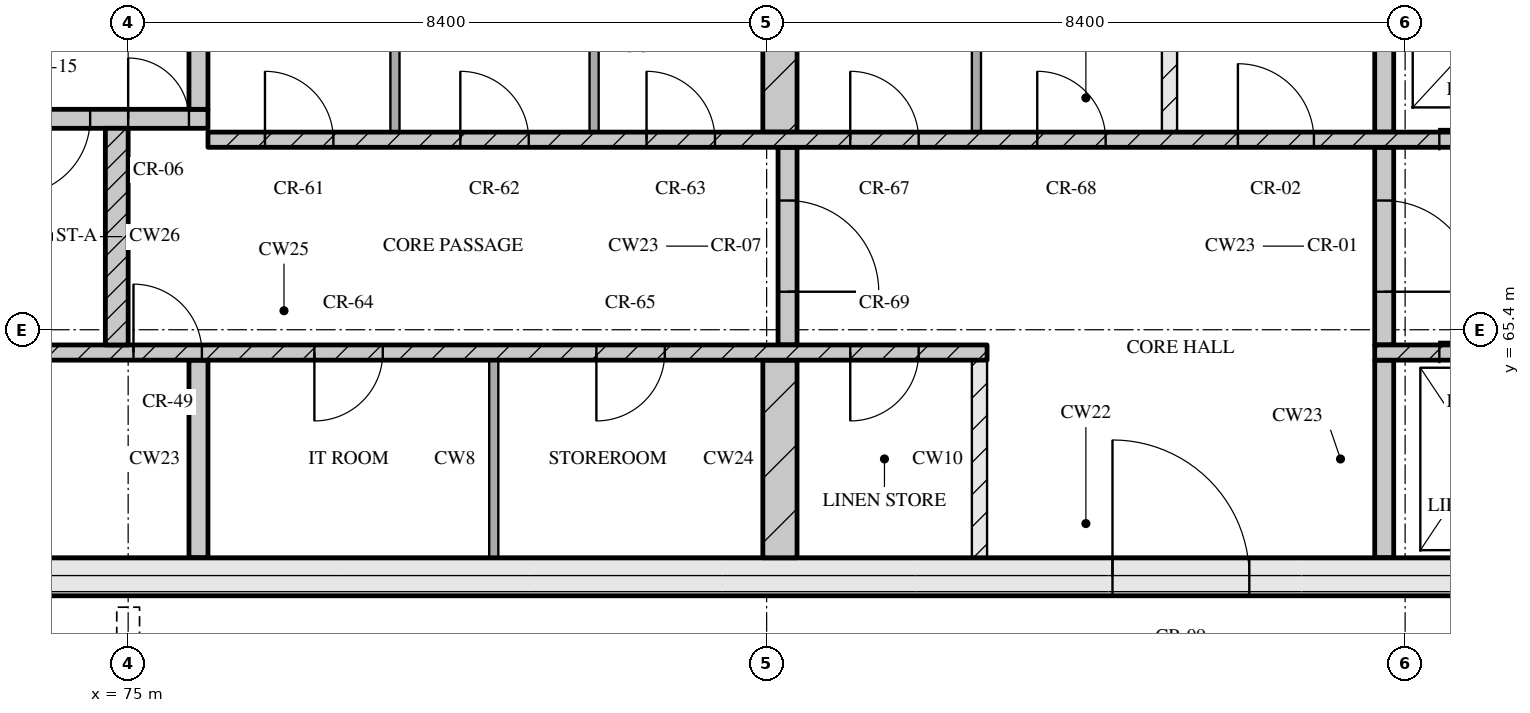
"""IFC4 building model, lengths in metres.
Left out: names, types, materials, properties, quantities, classifications, styles, units other than length and angle.
Written with IfcOpenShell. Run it as: python <this file> out.ifc"""

import sys

from ifc_helpers import new_model, si_unit, direction, frame, frame_2d, origin, place, context, subcontext, project, spatial, rectangle, extrude, element, fill, save


model = new_model("IFC4")
c1 = context("Model", 3, precision=1e-05, world=origin(), true_north=direction((0.0, 1.0)))
c2 = subcontext(c1, "Body", "Model", "MODEL_VIEW")
j1 = project(units=[si_unit("LENGTHUNIT", "METRE"), si_unit("PLANEANGLEUNIT", "RADIAN")], contexts=[c1])
p1 = place(None, origin())
s1 = spatial("IfcSite", under=j1, at=p1, CompositionType="ELEMENT")
p2 = place(p1, origin())
s2 = spatial("IfcBuilding", under=s1, at=p2, CompositionType="ELEMENT")
p3 = place(p2, frame((0.0, 0.0, 252.3)))
s3 = spatial("IfcBuildingStorey", under=s2, at=p3, CompositionType="ELEMENT", Elevation=252.3)
p4 = place(p3, frame((67.3, 62.15, 0.0), z_axis=(0.0, 0.0, 1.0), x_axis=(1.0, 0.0, 0.0)))
e1 = element("IfcWall", 1, at=p4, inside=s3, PredefinedType="SOLIDWALL", context=c2, shape_type="SweptSolid", body=[
    extrude(rectangle(XDim=40.6, YDim=0.5, at=frame_2d((20.3, 0.0))), origin(), (0.0, 0.0, 1.0), 10.97),
])
p5 = place(p4, frame((20.65, 0.0, 0.0)))
e2 = element("IfcOpeningElement", 2, at=p5, cuts=e1, PredefinedType="OPENING", context=c2, shape_type="SweptSolid", body=[
    extrude(rectangle(XDim=1.8, YDim=2.1, at=frame_2d((0.9, 1.05))), frame((0.0, 0.26, 0.0), z_axis=(0.0, -1.0, 0.0), x_axis=(1.0, 0.0, 0.0)), (0.0, 0.0, 1.0), 0.52),
])
p6 = place(p3, frame((75.925, 62.4, 0.0), z_axis=(0.0, 0.0, 1.0), x_axis=(0.0, 1.0, 0.0)))
e3 = element("IfcWall", 3, at=p6, inside=s3, PredefinedType="SOLIDWALL", context=c2, shape_type="SweptSolid", body=[
    extrude(rectangle(XDim=2.6, YDim=0.25, at=frame_2d((1.3, 0.0))), origin(), (0.0, 0.0, 1.0), 10.97),
])
p7 = place(p3, frame((79.81, 62.4, 0.0), z_axis=(0.0, 0.0, 1.0), x_axis=(0.0, 1.0, 0.0)))
e4 = element("IfcWall", 4, at=p7, inside=s3, PredefinedType="PARTITIONING", context=c2, shape_type="SweptSolid", body=[
    extrude(rectangle(XDim=2.6, YDim=0.12, at=frame_2d((1.3, 0.0))), origin(), (0.0, 0.0, 1.0), 10.97),
])
p8 = place(p3, frame((83.575, 62.4, 0.0), z_axis=(0.0, 0.0, 1.0), x_axis=(0.0, 1.0, 0.0)))
e5 = element("IfcWall", 5, at=p8, inside=s3, PredefinedType="SOLIDWALL", context=c2, shape_type="SweptSolid", body=[
    extrude(rectangle(XDim=2.6, YDim=0.45, at=frame_2d((1.3, 0.0))), origin(), (0.0, 0.0, 1.0), 10.97),
])
p9 = place(p3, frame((86.2, 62.4, 0.0), z_axis=(0.0, 0.0, 1.0), x_axis=(0.0, 1.0, 0.0)))
e6 = element("IfcWall", 6, at=p9, inside=s3, PredefinedType="PARTITIONING", context=c2, shape_type="SweptSolid", body=[
    extrude(rectangle(XDim=2.6, YDim=0.2, at=frame_2d((1.3, 0.0))), origin(), (0.0, 0.0, 1.0), 10.97),
])
p10 = place(p3, frame((91.525, 62.4, 0.0), z_axis=(0.0, 0.0, 1.0), x_axis=(0.0, 1.0, 0.0)))
e7 = element("IfcWall", 7, at=p10, inside=s3, PredefinedType="SOLIDWALL", context=c2, shape_type="SweptSolid", body=[
    extrude(rectangle(XDim=2.6, YDim=0.25, at=frame_2d((1.3, 0.0))), origin(), (0.0, 0.0, 1.0), 10.97),
])
p11 = place(p3, frame((67.8, 65.1, 0.0), z_axis=(0.0, 0.0, 1.0), x_axis=(1.0, 0.0, 0.0)))
e8 = element("IfcWall", 8, at=p11, inside=s3, PredefinedType="SOLIDWALL", context=c2, shape_type="SweptSolid", body=[
    extrude(rectangle(XDim=18.5, YDim=0.2, at=frame_2d((9.25, 0.0))), origin(), (0.0, 0.0, 1.0), 10.97),
])
p12 = place(p11, frame((7.27, 0.0, 0.0)))
e9 = element("IfcOpeningElement", 9, at=p12, cuts=e8, PredefinedType="OPENING", context=c2, shape_type="SweptSolid", body=[
    extrude(rectangle(XDim=0.9, YDim=2.1, at=frame_2d((0.45, 1.05))), frame((0.0, 0.11, 0.0), z_axis=(0.0, -1.0, 0.0), x_axis=(1.0, 0.0, 0.0)), (0.0, 0.0, 1.0), 0.22),
])
p13 = place(p11, frame((9.65, 0.0, 0.0)))
e10 = element("IfcOpeningElement", 10, at=p13, cuts=e8, PredefinedType="OPENING", context=c2, shape_type="SweptSolid", body=[
    extrude(rectangle(XDim=0.9, YDim=2.1, at=frame_2d((0.45, 1.05))), frame((0.0, 0.11, 0.0), z_axis=(0.0, -1.0, 0.0), x_axis=(1.0, 0.0, 0.0)), (0.0, 0.0, 1.0), 0.22),
])
p14 = place(p11, frame((13.36, 0.0, 0.0)))
e11 = element("IfcOpeningElement", 11, at=p14, cuts=e8, PredefinedType="OPENING", context=c2, shape_type="SweptSolid", body=[
    extrude(rectangle(XDim=0.9, YDim=2.1, at=frame_2d((0.45, 1.05))), frame((0.0, 0.11, 0.0), z_axis=(0.0, -1.0, 0.0), x_axis=(1.0, 0.0, 0.0)), (0.0, 0.0, 1.0), 0.22),
])
p15 = place(p11, frame((16.7, 0.0, 0.0)))
e12 = element("IfcOpeningElement", 12, at=p15, cuts=e8, PredefinedType="OPENING", context=c2, shape_type="SweptSolid", body=[
    extrude(rectangle(XDim=0.9, YDim=2.1, at=frame_2d((0.45, 1.05))), frame((0.0, 0.11, 0.0), z_axis=(0.0, -1.0, 0.0), x_axis=(1.0, 0.0, 0.0)), (0.0, 0.0, 1.0), 0.22),
])
p16 = place(p3, frame((91.4, 65.1, 0.0), z_axis=(0.0, 0.0, 1.0), x_axis=(1.0, 0.0, 0.0)))
e13 = element("IfcWall", 13, at=p16, inside=s3, PredefinedType="SOLIDWALL", context=c2, shape_type="SweptSolid", body=[
    extrude(rectangle(XDim=16.0, YDim=0.2, at=frame_2d((8.0, 0.0))), origin(), (0.0, 0.0, 1.0), 10.97),
])
p17 = place(p16, frame((0.85, 0.0, 0.0)))
e14 = element("IfcOpeningElement", 14, at=p17, cuts=e13, PredefinedType="OPENING", context=c2, shape_type="SweptSolid", body=[
    extrude(rectangle(XDim=1.1, YDim=2.1, at=frame_2d((0.55, 1.05))), frame((0.0, 0.11, 0.0), z_axis=(0.0, -1.0, 0.0), x_axis=(1.0, 0.0, 0.0)), (0.0, 0.0, 1.0), 0.22),
])
p18 = place(p16, frame((3.35, 0.0, 0.0)))
e15 = element("IfcOpeningElement", 15, at=p18, cuts=e13, PredefinedType="OPENING", context=c2, shape_type="SweptSolid", body=[
    extrude(rectangle(XDim=1.1, YDim=2.1, at=frame_2d((0.55, 1.05))), frame((0.0, 0.11, 0.0), z_axis=(0.0, -1.0, 0.0), x_axis=(1.0, 0.0, 0.0)), (0.0, 0.0, 1.0), 0.22),
])
p19 = place(p16, frame((5.85, 0.0, 0.0)))
e16 = element("IfcOpeningElement", 16, at=p19, cuts=e13, PredefinedType="OPENING", context=c2, shape_type="SweptSolid", body=[
    extrude(rectangle(XDim=1.1, YDim=2.1, at=frame_2d((0.55, 1.05))), frame((0.0, 0.11, 0.0), z_axis=(0.0, -1.0, 0.0), x_axis=(1.0, 0.0, 0.0)), (0.0, 0.0, 1.0), 0.22),
])
p20 = place(p16, frame((7.83, 0.0, 0.0)))
e17 = element("IfcOpeningElement", 17, at=p20, cuts=e13, PredefinedType="OPENING", context=c2, shape_type="SweptSolid", body=[
    extrude(rectangle(XDim=0.9, YDim=2.1, at=frame_2d((0.45, 1.05))), frame((0.0, 0.11, 0.0), z_axis=(0.0, -1.0, 0.0), x_axis=(1.0, 0.0, 0.0)), (0.0, 0.0, 1.0), 0.22),
])
p21 = place(p3, frame((74.85, 65.2, 0.0), z_axis=(0.0, 0.0, 1.0), x_axis=(0.0, 1.0, 0.0)))
e18 = element("IfcWall", 18, at=p21, inside=s3, PredefinedType="SOLIDWALL", context=c2, shape_type="SweptSolid", body=[
    extrude(rectangle(XDim=2.85, YDim=0.3, at=frame_2d((1.425, 0.0))), origin(), (0.0, 0.0, 1.0), 10.97),
])
p22 = place(p3, frame((83.675, 65.2, 0.0), z_axis=(0.0, 0.0, 1.0), x_axis=(0.0, 1.0, 0.0)))
e19 = element("IfcWall", 19, at=p22, inside=s3, PredefinedType="SOLIDWALL", context=c2, shape_type="SweptSolid", body=[
    extrude(rectangle(XDim=2.6, YDim=0.25, at=frame_2d((1.3, 0.0))), origin(), (0.0, 0.0, 1.0), 10.97),
])
p23 = place(p22, frame((0.7, 0.0, 0.0)))
e20 = element("IfcOpeningElement", 20, at=p23, cuts=e19, PredefinedType="OPENING", context=c2, shape_type="SweptSolid", body=[
    extrude(rectangle(XDim=1.2, YDim=2.1, at=frame_2d((0.6, 1.05))), frame((0.0, 0.135, 0.0), z_axis=(0.0, -1.0, 0.0), x_axis=(1.0, 0.0, 0.0)), (0.0, 0.0, 1.0), 0.27),
])
p24 = place(p3, frame((91.525, 65.2, 0.0), z_axis=(0.0, 0.0, 1.0), x_axis=(0.0, 1.0, 0.0)))
e21 = element("IfcWall", 21, at=p24, inside=s3, PredefinedType="SOLIDWALL", context=c2, shape_type="SweptSolid", body=[
    extrude(rectangle(XDim=2.6, YDim=0.25, at=frame_2d((1.3, 0.0))), origin(), (0.0, 0.0, 1.0), 10.97),
])
p25 = place(p24, frame((0.7, 0.0, 0.0)))
e22 = element("IfcOpeningElement", 22, at=p25, cuts=e21, PredefinedType="OPENING", context=c2, shape_type="SweptSolid", body=[
    extrude(rectangle(XDim=1.2, YDim=2.1, at=frame_2d((0.6, 1.05))), frame((0.0, 0.135, 0.0), z_axis=(0.0, -1.0, 0.0), x_axis=(1.0, 0.0, 0.0)), (0.0, 0.0, 1.0), 0.27),
])
p26 = place(p3, frame((76.05, 67.9, 0.0), z_axis=(0.0, 0.0, 1.0), x_axis=(1.0, 0.0, 0.0)))
e23 = element("IfcWall", 23, at=p26, inside=s3, PredefinedType="SOLIDWALL", context=c2, shape_type="SweptSolid", body=[
    extrude(rectangle(XDim=23.1, YDim=0.2, at=frame_2d((11.55, 0.0))), origin(), (0.0, 0.0, 1.0), 10.97),
])
p27 = place(p26, frame((0.75, 0.0, 0.0)))
e24 = element("IfcOpeningElement", 24, at=p27, cuts=e23, PredefinedType="OPENING", context=c2, shape_type="SweptSolid", body=[
    extrude(rectangle(XDim=0.9, YDim=2.1, at=frame_2d((0.45, 1.05))), frame((0.0, 0.11, 0.0), z_axis=(0.0, -1.0, 0.0), x_axis=(1.0, 0.0, 0.0)), (0.0, 0.0, 1.0), 0.22),
])
p28 = place(p26, frame((3.32, 0.0, 0.0)))
e25 = element("IfcOpeningElement", 25, at=p28, cuts=e23, PredefinedType="OPENING", context=c2, shape_type="SweptSolid", body=[
    extrude(rectangle(XDim=0.9, YDim=2.1, at=frame_2d((0.45, 1.05))), frame((0.0, 0.11, 0.0), z_axis=(0.0, -1.0, 0.0), x_axis=(1.0, 0.0, 0.0)), (0.0, 0.0, 1.0), 0.22),
])
p29 = place(p26, frame((5.77, 0.0, 0.0)))
e26 = element("IfcOpeningElement", 26, at=p29, cuts=e23, PredefinedType="OPENING", context=c2, shape_type="SweptSolid", body=[
    extrude(rectangle(XDim=0.9, YDim=2.1, at=frame_2d((0.45, 1.05))), frame((0.0, 0.11, 0.0), z_axis=(0.0, -1.0, 0.0), x_axis=(1.0, 0.0, 0.0)), (0.0, 0.0, 1.0), 0.22),
])
p30 = place(p26, frame((8.45, 0.0, 0.0)))
e27 = element("IfcOpeningElement", 27, at=p30, cuts=e23, PredefinedType="OPENING", context=c2, shape_type="SweptSolid", body=[
    extrude(rectangle(XDim=0.9, YDim=2.1, at=frame_2d((0.45, 1.05))), frame((0.0, 0.11, 0.0), z_axis=(0.0, -1.0, 0.0), x_axis=(1.0, 0.0, 0.0)), (0.0, 0.0, 1.0), 0.22),
])
p31 = place(p26, frame((10.91, 0.0, 0.0)))
e28 = element("IfcOpeningElement", 28, at=p31, cuts=e23, PredefinedType="OPENING", context=c2, shape_type="SweptSolid", body=[
    extrude(rectangle(XDim=0.9, YDim=2.1, at=frame_2d((0.45, 1.05))), frame((0.0, 0.11, 0.0), z_axis=(0.0, -1.0, 0.0), x_axis=(1.0, 0.0, 0.0)), (0.0, 0.0, 1.0), 0.22),
])
p32 = place(p26, frame((13.55, 0.0, 0.0)))
e29 = element("IfcOpeningElement", 29, at=p32, cuts=e23, PredefinedType="OPENING", context=c2, shape_type="SweptSolid", body=[
    extrude(rectangle(XDim=1.0, YDim=2.1, at=frame_2d((0.5, 1.05))), frame((0.0, 0.11, 0.0), z_axis=(0.0, -1.0, 0.0), x_axis=(1.0, 0.0, 0.0)), (0.0, 0.0, 1.0), 0.22),
])
p33 = place(p26, frame((16.2, 0.0, 0.0)))
e30 = element("IfcOpeningElement", 30, at=p33, cuts=e23, PredefinedType="OPENING", context=c2, shape_type="SweptSolid", body=[
    extrude(rectangle(XDim=1.1, YDim=2.1, at=frame_2d((0.55, 1.05))), frame((0.0, 0.11, 0.0), z_axis=(0.0, -1.0, 0.0), x_axis=(1.0, 0.0, 0.0)), (0.0, 0.0, 1.0), 0.22),
])
p34 = place(p26, frame((18.7, 0.0, 0.0)))
e31 = element("IfcOpeningElement", 31, at=p34, cuts=e23, PredefinedType="OPENING", context=c2, shape_type="SweptSolid", body=[
    extrude(rectangle(XDim=1.1, YDim=2.1, at=frame_2d((0.55, 1.05))), frame((0.0, 0.11, 0.0), z_axis=(0.0, -1.0, 0.0), x_axis=(1.0, 0.0, 0.0)), (0.0, 0.0, 1.0), 0.22),
])
p35 = place(p26, frame((21.2, 0.0, 0.0)))
e32 = element("IfcOpeningElement", 32, at=p35, cuts=e23, PredefinedType="OPENING", context=c2, shape_type="SweptSolid", body=[
    extrude(rectangle(XDim=1.1, YDim=2.1, at=frame_2d((0.55, 1.05))), frame((0.0, 0.11, 0.0), z_axis=(0.0, -1.0, 0.0), x_axis=(1.0, 0.0, 0.0)), (0.0, 0.0, 1.0), 0.22),
])
for number, where, z_axis, x_axis in (
    (33, (78.51, 68.0, 0.0), (0.0, 0.0, 1.0), (0.0, 1.0, 0.0)),
    (34, (81.13, 68.0, 0.0), (0.0, 0.0, 1.0), (0.0, 1.0, 0.0)),
):
    element("IfcWall", number, at=place(p3, frame(where, z_axis=z_axis, x_axis=x_axis)), inside=s3, PredefinedType="PARTITIONING", context=c2, shape_type="SweptSolid", body=[
        extrude(rectangle(XDim=2.6, YDim=0.12, at=frame_2d((1.3, 0.0))), origin(), (0.0, 0.0, 1.0), 10.97),
    ])
p36 = place(p3, frame((83.575, 68.0, 0.0), z_axis=(0.0, 0.0, 1.0), x_axis=(0.0, 1.0, 0.0)))
e35 = element("IfcWall", 35, at=p36, inside=s3, PredefinedType="SOLIDWALL", context=c2, shape_type="SweptSolid", body=[
    extrude(rectangle(XDim=2.6, YDim=0.45, at=frame_2d((1.3, 0.0))), origin(), (0.0, 0.0, 1.0), 10.97),
])
p37 = place(p3, frame((86.16, 68.0, 0.0), z_axis=(0.0, 0.0, 1.0), x_axis=(0.0, 1.0, 0.0)))
e36 = element("IfcWall", 36, at=p37, inside=s3, PredefinedType="PARTITIONING", context=c2, shape_type="SweptSolid", body=[
    extrude(rectangle(XDim=2.6, YDim=0.12, at=frame_2d((1.3, 0.0))), origin(), (0.0, 0.0, 1.0), 10.97),
])
p38 = place(p3, frame((88.7, 68.0, 0.0), z_axis=(0.0, 0.0, 1.0), x_axis=(0.0, 1.0, 0.0)))
e37 = element("IfcWall", 37, at=p38, inside=s3, PredefinedType="PARTITIONING", context=c2, shape_type="SweptSolid", body=[
    extrude(rectangle(XDim=2.6, YDim=0.2, at=frame_2d((1.3, 0.0))), origin(), (0.0, 0.0, 1.0), 10.97),
])
p39 = place(p3, frame((91.525, 68.0, 0.0), z_axis=(0.0, 0.0, 1.0), x_axis=(0.0, 1.0, 0.0)))
e38 = element("IfcWall", 38, at=p39, inside=s3, PredefinedType="SOLIDWALL", context=c2, shape_type="SweptSolid", body=[
    extrude(rectangle(XDim=2.6, YDim=0.25, at=frame_2d((1.3, 0.0))), origin(), (0.0, 0.0, 1.0), 10.97),
])
p40 = place(p3, frame((67.8, 68.175, 0.0), z_axis=(0.0, 0.0, 1.0), x_axis=(1.0, 0.0, 0.0)))
e39 = element("IfcWall", 39, at=p40, inside=s3, PredefinedType="SOLIDWALL", context=c2, shape_type="SweptSolid", body=[
    extrude(rectangle(XDim=8.25, YDim=0.25, at=frame_2d((4.125, 0.0))), origin(), (0.0, 0.0, 1.0), 10.97),
])
p41 = place(p40, frame((5.7, 0.0, 0.0)))
e40 = element("IfcOpeningElement", 40, at=p41, cuts=e39, PredefinedType="OPENING", context=c2, shape_type="SweptSolid", body=[
    extrude(rectangle(XDim=1.0, YDim=2.1, at=frame_2d((0.5, 1.05))), frame((0.0, 0.135, 0.0), z_axis=(0.0, -1.0, 0.0), x_axis=(1.0, 0.0, 0.0)), (0.0, 0.0, 1.0), 0.27),
])
p42 = place(p40, frame((7.2, 0.0, 0.0)))
e41 = element("IfcOpeningElement", 41, at=p42, cuts=e39, PredefinedType="OPENING", context=c2, shape_type="SweptSolid", body=[
    extrude(rectangle(XDim=0.8, YDim=2.1, at=frame_2d((0.4, 1.05))), frame((0.0, 0.135, 0.0), z_axis=(0.0, -1.0, 0.0), x_axis=(1.0, 0.0, 0.0)), (0.0, 0.0, 1.0), 0.27),
])
p43 = place(p3, frame((75.925, 68.3, 0.0), z_axis=(0.0, 0.0, 1.0), x_axis=(0.0, 1.0, 0.0)))
e42 = element("IfcWall", 42, at=p43, inside=s3, PredefinedType="SOLIDWALL", context=c2, shape_type="SweptSolid", body=[
    extrude(rectangle(XDim=2.3, YDim=0.25, at=frame_2d((1.15, 0.0))), origin(), (0.0, 0.0, 1.0), 10.97),
])
p44 = place(p5, origin())
e43 = element("IfcDoor", 43, at=p44, inside=s3, OperationType="DOUBLE_DOOR_SINGLE_SWING", PredefinedType="DOOR", context=c2, shape_type="SweptSolid", body=[
    extrude(rectangle(XDim=1.8, YDim=2.1, at=frame_2d((0.9, 1.05))), frame((0.0, 0.025, 0.0), z_axis=(0.0, -1.0, 0.0), x_axis=(1.0, 0.0, 0.0)), (0.0, 0.0, 1.0), 0.05),
])
fill(e2, e43)
p45 = place(p12, origin())
e44 = element("IfcDoor", 44, at=p45, inside=s3, OperationType="SINGLE_SWING_LEFT", PredefinedType="DOOR", context=c2, shape_type="SweptSolid", body=[
    extrude(rectangle(XDim=0.9, YDim=2.1, at=frame_2d((0.45, 1.05))), frame((0.0, 0.025, 0.0), z_axis=(0.0, -1.0, 0.0), x_axis=(1.0, 0.0, 0.0)), (0.0, 0.0, 1.0), 0.05),
])
fill(e9, e44)
p46 = place(p13, origin())
e45 = element("IfcDoor", 45, at=p46, inside=s3, OperationType="SINGLE_SWING_RIGHT", PredefinedType="DOOR", context=c2, shape_type="SweptSolid", body=[
    extrude(rectangle(XDim=0.9, YDim=2.1, at=frame_2d((0.45, 1.05))), frame((0.0, 0.025, 0.0), z_axis=(0.0, -1.0, 0.0), x_axis=(1.0, 0.0, 0.0)), (0.0, 0.0, 1.0), 0.05),
])
fill(e10, e45)
p47 = place(p14, origin())
e46 = element("IfcDoor", 46, at=p47, inside=s3, OperationType="SINGLE_SWING_RIGHT", PredefinedType="DOOR", context=c2, shape_type="SweptSolid", body=[
    extrude(rectangle(XDim=0.9, YDim=2.1, at=frame_2d((0.45, 1.05))), frame((0.0, 0.025, 0.0), z_axis=(0.0, -1.0, 0.0), x_axis=(1.0, 0.0, 0.0)), (0.0, 0.0, 1.0), 0.05),
])
fill(e11, e46)
p48 = place(p15, origin())
e47 = element("IfcDoor", 47, at=p48, inside=s3, OperationType="SINGLE_SWING_RIGHT", PredefinedType="DOOR", context=c2, shape_type="SweptSolid", body=[
    extrude(rectangle(XDim=0.9, YDim=2.1, at=frame_2d((0.45, 1.05))), frame((0.0, 0.025, 0.0), z_axis=(0.0, -1.0, 0.0), x_axis=(1.0, 0.0, 0.0)), (0.0, 0.0, 1.0), 0.05),
])
fill(e12, e47)
p49 = place(p17, origin())
e48 = element("IfcDoor", 48, at=p49, inside=s3, OperationType="SLIDING_TO_LEFT", PredefinedType="DOOR", context=c2, shape_type="SweptSolid", body=[
    extrude(rectangle(XDim=1.1, YDim=2.1, at=frame_2d((0.55, 1.05))), frame((0.0, 0.025, 0.0), z_axis=(0.0, -1.0, 0.0), x_axis=(1.0, 0.0, 0.0)), (0.0, 0.0, 1.0), 0.05),
])
fill(e14, e48)
p50 = place(p23, origin())
e49 = element("IfcDoor", 49, at=p50, inside=s3, OperationType="SINGLE_SWING_RIGHT", PredefinedType="DOOR", context=c2, shape_type="SweptSolid", body=[
    extrude(rectangle(XDim=1.2, YDim=2.1, at=frame_2d((0.6, 1.05))), frame((0.0, 0.025, 0.0), z_axis=(0.0, -1.0, 0.0), x_axis=(1.0, 0.0, 0.0)), (0.0, 0.0, 1.0), 0.05),
])
fill(e20, e49)
p51 = place(p25, origin())
e50 = element("IfcDoor", 50, at=p51, inside=s3, OperationType="SINGLE_SWING_RIGHT", PredefinedType="DOOR", context=c2, shape_type="SweptSolid", body=[
    extrude(rectangle(XDim=1.2, YDim=2.1, at=frame_2d((0.6, 1.05))), frame((0.0, 0.025, 0.0), z_axis=(0.0, -1.0, 0.0), x_axis=(1.0, 0.0, 0.0)), (0.0, 0.0, 1.0), 0.05),
])
fill(e22, e50)
p52 = place(p27, origin())
e51 = element("IfcDoor", 51, at=p52, inside=s3, OperationType="SINGLE_SWING_LEFT", PredefinedType="DOOR", context=c2, shape_type="SweptSolid", body=[
    extrude(rectangle(XDim=0.9, YDim=2.1, at=frame_2d((0.45, 1.05))), frame((0.0, 0.025, 0.0), z_axis=(0.0, -1.0, 0.0), x_axis=(1.0, 0.0, 0.0)), (0.0, 0.0, 1.0), 0.05),
])
fill(e24, e51)
p53 = place(p28, origin())
e52 = element("IfcDoor", 52, at=p53, inside=s3, OperationType="SINGLE_SWING_LEFT", PredefinedType="DOOR", context=c2, shape_type="SweptSolid", body=[
    extrude(rectangle(XDim=0.9, YDim=2.1, at=frame_2d((0.45, 1.05))), frame((0.0, 0.025, 0.0), z_axis=(0.0, -1.0, 0.0), x_axis=(1.0, 0.0, 0.0)), (0.0, 0.0, 1.0), 0.05),
])
fill(e25, e52)
p54 = place(p29, origin())
e53 = element("IfcDoor", 53, at=p54, inside=s3, OperationType="SINGLE_SWING_LEFT", PredefinedType="DOOR", context=c2, shape_type="SweptSolid", body=[
    extrude(rectangle(XDim=0.9, YDim=2.1, at=frame_2d((0.45, 1.05))), frame((0.0, 0.025, 0.0), z_axis=(0.0, -1.0, 0.0), x_axis=(1.0, 0.0, 0.0)), (0.0, 0.0, 1.0), 0.05),
])
fill(e26, e53)
p55 = place(p30, origin())
e54 = element("IfcDoor", 54, at=p55, inside=s3, OperationType="SINGLE_SWING_LEFT", PredefinedType="DOOR", context=c2, shape_type="SweptSolid", body=[
    extrude(rectangle(XDim=0.9, YDim=2.1, at=frame_2d((0.45, 1.05))), frame((0.0, 0.025, 0.0), z_axis=(0.0, -1.0, 0.0), x_axis=(1.0, 0.0, 0.0)), (0.0, 0.0, 1.0), 0.05),
])
fill(e27, e54)
p56 = place(p31, origin())
e55 = element("IfcDoor", 55, at=p56, inside=s3, OperationType="SINGLE_SWING_LEFT", PredefinedType="DOOR", context=c2, shape_type="SweptSolid", body=[
    extrude(rectangle(XDim=0.9, YDim=2.1, at=frame_2d((0.45, 1.05))), frame((0.0, 0.025, 0.0), z_axis=(0.0, -1.0, 0.0), x_axis=(1.0, 0.0, 0.0)), (0.0, 0.0, 1.0), 0.05),
])
fill(e28, e55)
p57 = place(p32, origin())
e56 = element("IfcDoor", 56, at=p57, inside=s3, OperationType="SINGLE_SWING_LEFT", PredefinedType="DOOR", context=c2, shape_type="SweptSolid", body=[
    extrude(rectangle(XDim=1.0, YDim=2.1, at=frame_2d((0.5, 1.05))), frame((0.0, 0.025, 0.0), z_axis=(0.0, -1.0, 0.0), x_axis=(1.0, 0.0, 0.0)), (0.0, 0.0, 1.0), 0.05),
])
fill(e29, e56)
p58 = place(p33, origin())
e57 = element("IfcDoor", 57, at=p58, inside=s3, OperationType="SLIDING_TO_RIGHT", PredefinedType="DOOR", context=c2, shape_type="SweptSolid", body=[
    extrude(rectangle(XDim=1.1, YDim=2.1, at=frame_2d((0.55, 1.05))), frame((0.0, 0.025, 0.0), z_axis=(0.0, -1.0, 0.0), x_axis=(1.0, 0.0, 0.0)), (0.0, 0.0, 1.0), 0.05),
])
fill(e30, e57)
p59 = place(p41, origin())
e58 = element("IfcDoor", 58, at=p59, inside=s3, OperationType="SINGLE_SWING_RIGHT", PredefinedType="DOOR", context=c2, shape_type="SweptSolid", body=[
    extrude(rectangle(XDim=1.0, YDim=2.1, at=frame_2d((0.5, 1.05))), frame((0.0, 0.025, 0.0), z_axis=(0.0, -1.0, 0.0), x_axis=(1.0, 0.0, 0.0)), (0.0, 0.0, 1.0), 0.05),
])
fill(e40, e58)
p60 = place(p42, origin())
e59 = element("IfcDoor", 59, at=p60, inside=s3, OperationType="SINGLE_SWING_LEFT", PredefinedType="DOOR", context=c2, shape_type="SweptSolid", body=[
    extrude(rectangle(XDim=0.8, YDim=2.1, at=frame_2d((0.4, 1.05))), frame((0.0, 0.025, 0.0), z_axis=(0.0, -1.0, 0.0), x_axis=(1.0, 0.0, 0.0)), (0.0, 0.0, 1.0), 0.05),
])
fill(e41, e59)
save(model, sys.argv[1])
